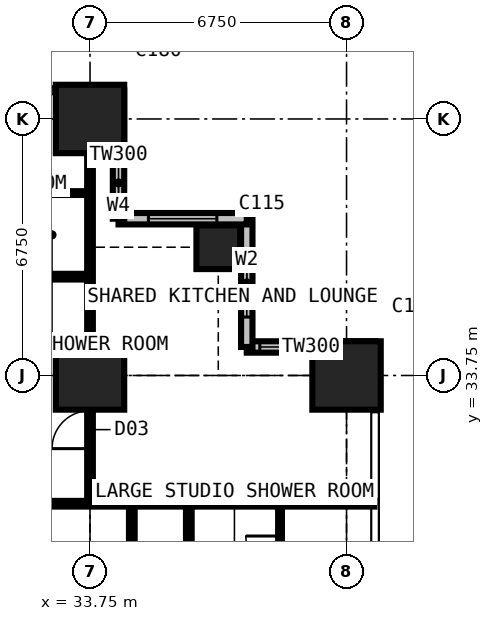
"""IFC4 building model, lengths in metres.
Left out: names, types, materials, properties, quantities, classifications, styles, units other than length and angle.
Written with IfcOpenShell. Run it as: python <this file> out.ifc"""

import sys

from ifc_helpers import new_model, si_unit, direction, frame, frame_2d, origin, origin_2d, place, context, subcontext, project, spatial, rectangle, extrude, element, fill, save


model = new_model("IFC4")
c1 = context("Model", 3, precision=1e-05, world=origin(), true_north=direction((0.0, 1.0)))
c2 = subcontext(c1, "Body", "Model", "MODEL_VIEW")
j1 = project(units=[si_unit("LENGTHUNIT", "METRE"), si_unit("PLANEANGLEUNIT", "RADIAN")], contexts=[c1])
p1 = place(None, origin())
s1 = spatial("IfcSite", under=j1, at=p1, CompositionType="ELEMENT")
p2 = place(p1, origin())
s2 = spatial("IfcBuilding", under=s1, at=p2, CompositionType="ELEMENT")
p3 = place(p2, frame((0.0, 0.0, 54.0)))
s3 = spatial("IfcBuildingStorey", under=s2, at=p3, CompositionType="ELEMENT", Elevation=54.0)
for number, where, z_axis, x_axis in (
    (1, (33.75, 33.75, 0.0), (0.0, 0.0, 1.0), (1.0, 0.0, 0.0)),
    (2, (33.75, 40.5, 0.0), (0.0, 0.0, 1.0), (1.0, 0.0, 0.0)),
):
    element("IfcColumn", number, at=place(p3, frame(where, z_axis=z_axis, x_axis=x_axis)), inside=s3, PredefinedType="COLUMN", context=c2, shape_type="SweptSolid", body=[
        extrude(rectangle(XDim=1.8, YDim=1.8, at=origin_2d()), origin(), (0.0, 0.0, 1.0), 3.6),
    ])
p4 = place(p3, frame((37.125, 37.125, 0.0), z_axis=(0.0, 0.0, 1.0), x_axis=(1.0, 0.0, 0.0)))
e3 = element("IfcColumn", 3, at=p4, inside=s3, PredefinedType="COLUMN", context=c2, shape_type="SweptSolid", body=[
    extrude(rectangle(XDim=1.15, YDim=1.15, at=origin_2d()), origin(), (0.0, 0.0, 1.0), 3.6),
])
p5 = place(p3, frame((40.5, 33.75, 0.0), z_axis=(0.0, 0.0, 1.0), x_axis=(1.0, 0.0, 0.0)))
e4 = element("IfcColumn", 4, at=p5, inside=s3, PredefinedType="COLUMN", context=c2, shape_type="SweptSolid", body=[
    extrude(rectangle(XDim=1.8, YDim=1.8, at=origin_2d()), origin(), (0.0, 0.0, 1.0), 3.6),
])
p6 = place(p3, frame((41.25, 34.5, 0.0), z_axis=(0.0, 0.0, 1.0), x_axis=(-1.0, 0.0, 0.0)))
e5 = element("IfcWall", 5, at=p6, inside=s3, PredefinedType="SOLIDWALL", context=c2, shape_type="SweptSolid", body=[
    extrude(rectangle(XDim=3.375, YDim=0.3, at=frame_2d((1.688, 0.0))), origin(), (0.0, 0.0, 1.0), 3.375),
])
p7 = place(p6, frame((1.833, 0.0, 0.9)))
e6 = element("IfcOpeningElement", 6, at=p7, cuts=e5, PredefinedType="OPENING", context=c2, shape_type="SweptSolid", body=[
    extrude(rectangle(XDim=1.2, YDim=1.8, at=frame_2d((0.6, 0.9))), frame((0.0, 0.16, 0.0), z_axis=(0.0, -1.0, 0.0), x_axis=(1.0, 0.0, 0.0)), (0.0, 0.0, 1.0), 0.32),
])
p8 = place(p3, frame((37.875, 34.5, 0.0), z_axis=(0.0, 0.0, 1.0), x_axis=(0.0, 1.0, 0.0)))
e7 = element("IfcWall", 7, at=p8, inside=s3, PredefinedType="SOLIDWALL", context=c2, shape_type="SweptSolid", body=[
    extrude(rectangle(XDim=3.375, YDim=0.3, at=frame_2d((1.688, 0.0))), origin(), (0.0, 0.0, 1.0), 3.375),
])
p9 = place(p8, frame((0.788, 0.0, 0.6)))
e8 = element("IfcOpeningElement", 8, at=p9, cuts=e7, PredefinedType="OPENING", context=c2, shape_type="SweptSolid", body=[
    extrude(rectangle(XDim=1.8, YDim=2.1, at=frame_2d((0.9, 1.05))), frame((0.0, 0.16, 0.0), z_axis=(0.0, -1.0, 0.0), x_axis=(1.0, 0.0, 0.0)), (0.0, 0.0, 1.0), 0.32),
])
p10 = place(p3, frame((37.875, 37.875, 0.0), z_axis=(0.0, 0.0, 1.0), x_axis=(-1.0, 0.0, 0.0)))
e9 = element("IfcWall", 9, at=p10, inside=s3, PredefinedType="SOLIDWALL", context=c2, shape_type="SweptSolid", body=[
    extrude(rectangle(XDim=3.375, YDim=0.3, at=frame_2d((1.688, 0.0))), origin(), (0.0, 0.0, 1.0), 3.375),
])
p11 = place(p10, frame((0.788, 0.0, 0.6)))
e10 = element("IfcOpeningElement", 10, at=p11, cuts=e9, PredefinedType="OPENING", context=c2, shape_type="SweptSolid", body=[
    extrude(rectangle(XDim=1.8, YDim=2.1, at=frame_2d((0.9, 1.05))), frame((0.0, 0.16, 0.0), z_axis=(0.0, -1.0, 0.0), x_axis=(1.0, 0.0, 0.0)), (0.0, 0.0, 1.0), 0.32),
])
p12 = place(p3, frame((34.5, 37.875, 0.0), z_axis=(0.0, 0.0, 1.0), x_axis=(0.0, 1.0, 0.0)))
e11 = element("IfcWall", 11, at=p12, inside=s3, PredefinedType="SOLIDWALL", context=c2, shape_type="SweptSolid", body=[
    extrude(rectangle(XDim=3.375, YDim=0.3, at=frame_2d((1.688, 0.0))), origin(), (0.0, 0.0, 1.0), 3.375),
])
p13 = place(p12, frame((0.343, 0.0, 0.9)))
e12 = element("IfcOpeningElement", 12, at=p13, cuts=e11, PredefinedType="OPENING", context=c2, shape_type="SweptSolid", body=[
    extrude(rectangle(XDim=1.2, YDim=1.8, at=frame_2d((0.6, 0.9))), frame((0.0, 0.16, 0.0), z_axis=(0.0, -1.0, 0.0), x_axis=(1.0, 0.0, 0.0)), (0.0, 0.0, 1.0), 0.32),
])
p14 = place(p3, frame((10.125, 36.35, 0.0), z_axis=(0.0, 0.0, 1.0), x_axis=(1.0, 0.0, 0.0)))
e13 = element("IfcWall", 13, at=p14, inside=s3, PredefinedType="PARTITIONING", context=c2, shape_type="SweptSolid", body=[
    extrude(rectangle(XDim=23.625, YDim=0.15, at=frame_2d((11.812, 0.0))), origin(), (0.0, 0.0, 1.0), 3.375),
])
p15 = place(p14, frame((20.5, 0.0, 0.0)))
e14 = element("IfcOpeningElement", 14, at=p15, cuts=e13, PredefinedType="OPENING", context=c2, shape_type="SweptSolid", body=[
    extrude(rectangle(XDim=0.95, YDim=2.2, at=frame_2d((0.475, 1.1))), frame((0.0, 0.085, 0.0), z_axis=(0.0, -1.0, 0.0), x_axis=(1.0, 0.0, 0.0)), (0.0, 0.0, 1.0), 0.17),
])
p16 = place(p14, frame((17.125, 0.0, 0.0)))
e15 = element("IfcOpeningElement", 15, at=p16, cuts=e13, PredefinedType="OPENING", context=c2, shape_type="SweptSolid", body=[
    extrude(rectangle(XDim=0.95, YDim=2.2, at=frame_2d((0.475, 1.1))), frame((0.0, 0.085, 0.0), z_axis=(0.0, -1.0, 0.0), x_axis=(1.0, 0.0, 0.0)), (0.0, 0.0, 1.0), 0.17),
])
p17 = place(p14, frame((13.7, 0.0, 0.0)))
e16 = element("IfcOpeningElement", 16, at=p17, cuts=e13, PredefinedType="OPENING", context=c2, shape_type="SweptSolid", body=[
    extrude(rectangle(XDim=0.95, YDim=2.2, at=frame_2d((0.475, 1.1))), frame((0.0, 0.085, 0.0), z_axis=(0.0, -1.0, 0.0), x_axis=(1.0, 0.0, 0.0)), (0.0, 0.0, 1.0), 0.17),
])
p18 = place(p14, frame((4.2, 0.0, 0.0)))
e17 = element("IfcOpeningElement", 17, at=p18, cuts=e13, PredefinedType="OPENING", context=c2, shape_type="SweptSolid", body=[
    extrude(rectangle(XDim=0.95, YDim=2.2, at=frame_2d((0.475, 1.1))), frame((0.0, 0.085, 0.0), z_axis=(0.0, -1.0, 0.0), x_axis=(1.0, 0.0, 0.0)), (0.0, 0.0, 1.0), 0.17),
])
p19 = place(p14, frame((10.95, 0.0, 0.0)))
e18 = element("IfcOpeningElement", 18, at=p19, cuts=e13, PredefinedType="OPENING", context=c2, shape_type="SweptSolid", body=[
    extrude(rectangle(XDim=0.95, YDim=2.2, at=frame_2d((0.475, 1.1))), frame((0.0, 0.085, 0.0), z_axis=(0.0, -1.0, 0.0), x_axis=(1.0, 0.0, 0.0)), (0.0, 0.0, 1.0), 0.17),
])
p20 = place(p3, frame((30.375, 30.375, 0.0), z_axis=(0.0, 0.0, 1.0), x_axis=(1.0, 0.0, 0.0)))
e19 = element("IfcWall", 19, at=p20, inside=s3, PredefinedType="PARTITIONING", context=c2, shape_type="SweptSolid", body=[
    extrude(rectangle(XDim=10.859, YDim=0.15, at=frame_2d((5.429, 0.0))), origin(), (0.0, 0.0, 1.0), 3.375),
])
p21 = place(p3, frame((31.75, 38.55, 0.0), z_axis=(0.0, 0.0, 1.0), x_axis=(1.0, 0.0, 0.0)))
e20 = element("IfcWall", 20, at=p21, inside=s3, PredefinedType="PARTITIONING", context=c2, shape_type="SweptSolid", body=[
    extrude(rectangle(XDim=2.0, YDim=0.1, at=frame_2d((1.0, 0.0))), origin(), (0.0, 0.0, 1.0), 3.375),
])
p22 = place(p3, frame((33.75, 30.375, 0.0), z_axis=(0.0, 0.0, 1.0), x_axis=(0.0, 1.0, 0.0)))
e21 = element("IfcWall", 21, at=p22, inside=s3, PredefinedType="PARTITIONING", context=c2, shape_type="SweptSolid", body=[
    extrude(rectangle(XDim=10.859, YDim=0.15, at=frame_2d((5.429, 0.0))), origin(), (0.0, 0.0, 1.0), 2.877),
])
p23 = place(p22, frame((1.45, 0.0, 0.0)))
e22 = element("IfcOpeningElement", 22, at=p23, cuts=e21, PredefinedType="OPENING", context=c2, shape_type="SweptSolid", body=[
    extrude(rectangle(XDim=1.0, YDim=2.2, at=frame_2d((0.5, 1.1))), frame((0.0, 0.085, 0.0), z_axis=(0.0, -1.0, 0.0), x_axis=(1.0, 0.0, 0.0)), (0.0, 0.0, 1.0), 0.17),
])
p24 = place(p3, frame((34.85, 12.55, 0.0), z_axis=(0.0, 0.0, 1.0), x_axis=(0.0, 1.0, 0.0)))
e23 = element("IfcWall", 23, at=p24, inside=s3, PredefinedType="PARTITIONING", context=c2, shape_type="SweptSolid", body=[
    extrude(rectangle(XDim=17.825, YDim=0.15, at=frame_2d((8.913, 0.0))), origin(), (0.0, 0.0, 1.0), 3.375),
])
p25 = place(p24, frame((8.6, 0.0, 0.0)))
e24 = element("IfcOpeningElement", 24, at=p25, cuts=e23, PredefinedType="OPENING", context=c2, shape_type="SweptSolid", body=[
    extrude(rectangle(XDim=0.95, YDim=2.2, at=frame_2d((0.475, 1.1))), frame((0.0, 0.085, 0.0), z_axis=(0.0, -1.0, 0.0), x_axis=(1.0, 0.0, 0.0)), (0.0, 0.0, 1.0), 0.17),
])
p26 = place(p3, frame((36.35, 6.75, 0.0), z_axis=(0.0, 0.0, 1.0), x_axis=(0.0, 1.0, 0.0)))
e25 = element("IfcWall", 25, at=p26, inside=s3, PredefinedType="PARTITIONING", context=c2, shape_type="SweptSolid", body=[
    extrude(rectangle(XDim=23.625, YDim=0.15, at=frame_2d((11.812, 0.0))), origin(), (0.0, 0.0, 1.0), 3.375),
])
p27 = place(p26, frame((18.475, 0.0, 0.0)))
e26 = element("IfcOpeningElement", 26, at=p27, cuts=e25, PredefinedType="OPENING", context=c2, shape_type="SweptSolid", body=[
    extrude(rectangle(XDim=0.95, YDim=2.2, at=frame_2d((0.475, 1.1))), frame((0.0, 0.085, 0.0), z_axis=(0.0, -1.0, 0.0), x_axis=(1.0, 0.0, 0.0)), (0.0, 0.0, 1.0), 0.17),
])
p28 = place(p26, frame((11.725, 0.0, 0.0)))
e27 = element("IfcOpeningElement", 27, at=p28, cuts=e25, PredefinedType="OPENING", context=c2, shape_type="SweptSolid", body=[
    extrude(rectangle(XDim=0.95, YDim=2.2, at=frame_2d((0.475, 1.1))), frame((0.0, 0.085, 0.0), z_axis=(0.0, -1.0, 0.0), x_axis=(1.0, 0.0, 0.0)), (0.0, 0.0, 1.0), 0.17),
])
p29 = place(p26, frame((6.95, 0.0, 0.0)))
e28 = element("IfcOpeningElement", 28, at=p29, cuts=e25, PredefinedType="OPENING", context=c2, shape_type="SweptSolid", body=[
    extrude(rectangle(XDim=0.95, YDim=2.2, at=frame_2d((0.475, 1.1))), frame((0.0, 0.085, 0.0), z_axis=(0.0, -1.0, 0.0), x_axis=(1.0, 0.0, 0.0)), (0.0, 0.0, 1.0), 0.17),
])
p30 = place(p3, frame((38.75, 27.775, 0.0), z_axis=(0.0, 0.0, 1.0), x_axis=(0.0, 1.0, 0.0)))
e29 = element("IfcWall", 29, at=p30, inside=s3, PredefinedType="PARTITIONING", context=c2, shape_type="SweptSolid", body=[
    extrude(rectangle(XDim=2.6, YDim=0.1, at=frame_2d((1.3, 0.0))), origin(), (0.0, 0.0, 1.0), 3.375),
])
p31 = place(p30, frame((0.85, 0.0, 0.0)))
e30 = element("IfcOpeningElement", 30, at=p31, cuts=e29, PredefinedType="OPENING", context=c2, shape_type="SweptSolid", body=[
    extrude(rectangle(XDim=0.9, YDim=2.2, at=frame_2d((0.45, 1.1))), frame((0.0, 0.06, 0.0), z_axis=(0.0, -1.0, 0.0), x_axis=(1.0, 0.0, 0.0)), (0.0, 0.0, 1.0), 0.12),
])
p32 = place(p7, origin())
e31 = element("IfcWindow", 31, at=p32, inside=s3, PartitioningType="SINGLE_PANEL", PredefinedType="WINDOW", context=c2, shape_type="SweptSolid", body=[
    extrude(rectangle(XDim=1.2, YDim=1.8, at=frame_2d((0.6, 0.9))), frame((0.0, 0.03, 0.0), z_axis=(0.0, -1.0, 0.0), x_axis=(1.0, 0.0, 0.0)), (0.0, 0.0, 1.0), 0.06),
])
fill(e6, e31)
p33 = place(p9, origin())
e32 = element("IfcWindow", 32, at=p33, inside=s3, PartitioningType="SINGLE_PANEL", PredefinedType="WINDOW", context=c2, shape_type="SweptSolid", body=[
    extrude(rectangle(XDim=1.8, YDim=2.1, at=frame_2d((0.9, 1.05))), frame((0.0, 0.03, 0.0), z_axis=(0.0, -1.0, 0.0), x_axis=(1.0, 0.0, 0.0)), (0.0, 0.0, 1.0), 0.06),
])
fill(e8, e32)
p34 = place(p11, origin())
e33 = element("IfcWindow", 33, at=p34, inside=s3, PartitioningType="SINGLE_PANEL", PredefinedType="WINDOW", context=c2, shape_type="SweptSolid", body=[
    extrude(rectangle(XDim=1.8, YDim=2.1, at=frame_2d((0.9, 1.05))), frame((0.0, 0.03, 0.0), z_axis=(0.0, -1.0, 0.0), x_axis=(1.0, 0.0, 0.0)), (0.0, 0.0, 1.0), 0.06),
])
fill(e10, e33)
p35 = place(p13, origin())
e34 = element("IfcWindow", 34, at=p35, inside=s3, PartitioningType="SINGLE_PANEL", PredefinedType="WINDOW", context=c2, shape_type="SweptSolid", body=[
    extrude(rectangle(XDim=1.2, YDim=1.8, at=frame_2d((0.6, 0.9))), frame((0.0, 0.03, 0.0), z_axis=(0.0, -1.0, 0.0), x_axis=(1.0, 0.0, 0.0)), (0.0, 0.0, 1.0), 0.06),
])
fill(e12, e34)
p36 = place(p31, origin())
e35 = element("IfcDoor", 35, at=p36, inside=s3, OperationType="SINGLE_SWING_RIGHT", PredefinedType="DOOR", context=c2, shape_type="SweptSolid", body=[
    extrude(rectangle(XDim=0.9, YDim=2.2, at=frame_2d((0.45, 1.1))), frame((0.0, 0.025, 0.0), z_axis=(0.0, -1.0, 0.0), x_axis=(1.0, 0.0, 0.0)), (0.0, 0.0, 1.0), 0.05),
])
fill(e30, e35)
p37 = place(p23, origin())
e36 = element("IfcDoor", 36, at=p37, inside=s3, OperationType="SINGLE_SWING_LEFT", PredefinedType="DOOR", context=c2, shape_type="SweptSolid", body=[
    extrude(rectangle(XDim=1.0, YDim=2.2, at=frame_2d((0.5, 1.1))), frame((0.0, 0.025, 0.0), z_axis=(0.0, -1.0, 0.0), x_axis=(1.0, 0.0, 0.0)), (0.0, 0.0, 1.0), 0.05),
])
fill(e22, e36)
save(model, sys.argv[1])
